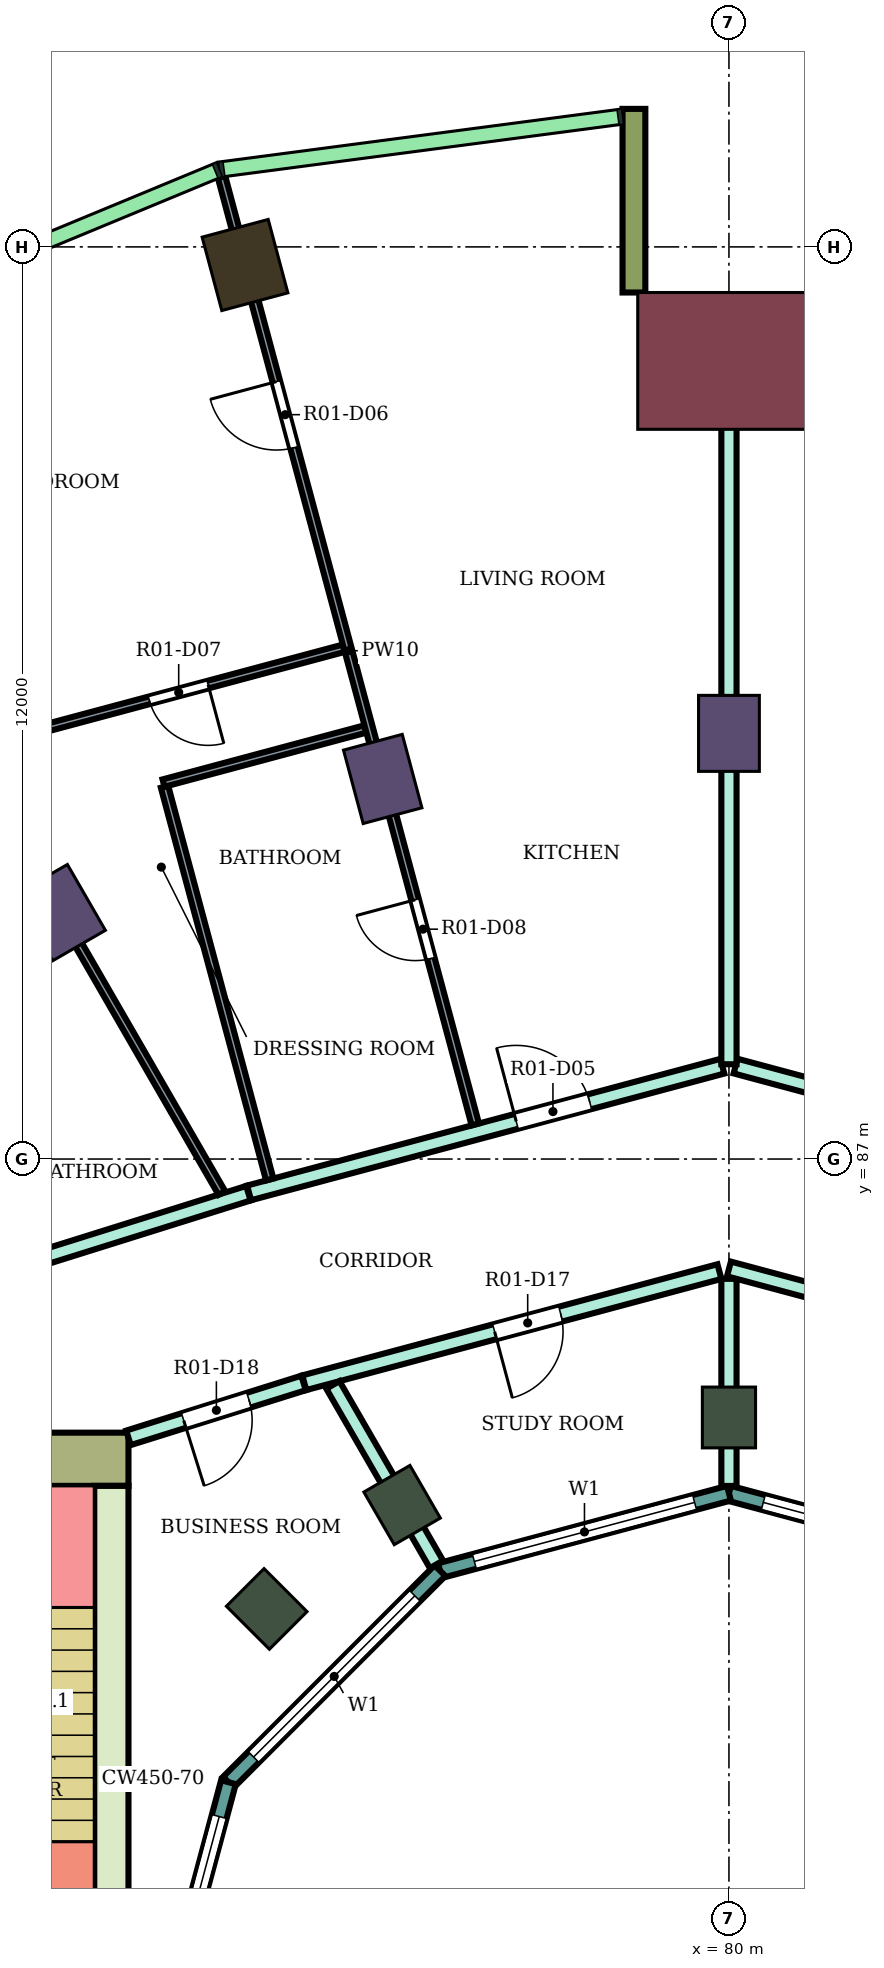
"""IFC4 building model, lengths in metres.
Left out: names, types, materials, properties, quantities, classifications, styles, units other than length and angle.
Written with IfcOpenShell. Run it as: python <this file> out.ifc"""

import sys

from ifc_helpers import new_model, si_unit, direction, frame, frame_2d, origin, origin_2d, place, context, subcontext, project, spatial, rectangle, extrude, element, fill, save


model = new_model("IFC4")
c1 = context("Model", 3, precision=1e-05, world=origin(), true_north=direction((0.0, 1.0)))
c2 = subcontext(c1, "Body", "Model", "MODEL_VIEW")
j1 = project(units=[si_unit("LENGTHUNIT", "METRE"), si_unit("PLANEANGLEUNIT", "RADIAN")], contexts=[c1])
p1 = place(None, origin())
s1 = spatial("IfcSite", under=j1, at=p1, CompositionType="ELEMENT")
p2 = place(p1, origin())
s2 = spatial("IfcBuilding", under=s1, at=p2, CompositionType="ELEMENT")
p3 = place(p2, frame((0.0, 0.0, 161.8)))
s3 = spatial("IfcBuildingStorey", under=s2, at=p3, CompositionType="ELEMENT", Elevation=161.8)
p4 = place(p3, frame((73.633, 98.762, 0.0), z_axis=(0.0, 0.0, 1.0), x_axis=(-0.258819045103, 0.965925826289, 0.0)))
e1 = element("IfcColumn", 1, at=p4, inside=s3, PredefinedType="COLUMN", context=c2, shape_type="SweptSolid", body=[
    extrude(rectangle(XDim=1.0, YDim=0.9, at=origin_2d()), origin(), (0.0, 0.0, 1.0), 4.1),
])
for number, where, z_axis, x_axis in (
    (2, (80.0, 92.6, 0.0), (0.0, 0.0, 1.0), (0.0, 1.0, 0.0)),
    (3, (75.445, 92.0, 0.0), (0.0, 0.0, 1.0), (-0.259, 0.966, 0.0)),
    (4, (71.2, 90.242, 0.0), (0.0, 0.0, 1.0), (-0.5, 0.866, 0.0)),
):
    element("IfcColumn", number, at=place(p3, frame(where, z_axis=z_axis, x_axis=x_axis)), inside=s3, PredefinedType="COLUMN", context=c2, shape_type="SweptSolid", body=[
        extrude(rectangle(XDim=1.0, YDim=0.8, at=origin_2d()), origin(), (0.0, 0.0, 1.0), 4.1),
    ])
for number, where, z_axis, x_axis in (
    (5, (80.0, 83.6, 0.0), (0.0, 0.0, 1.0), (0.0, 1.0, 0.0)),
    (6, (75.7, 82.448, 0.0), (0.0, 0.0, 1.0), (-0.5, 0.866, 0.0)),
    (7, (73.919, 81.081, 0.0), (0.0, 0.0, 1.0), (-0.707, 0.707, 0.0)),
):
    element("IfcColumn", number, at=place(p3, frame(where, z_axis=z_axis, x_axis=x_axis)), inside=s3, PredefinedType="COLUMN", context=c2, shape_type="SweptSolid", body=[
        extrude(rectangle(XDim=0.8, YDim=0.7, at=origin_2d()), origin(), (0.0, 0.0, 1.0), 4.1),
    ])
p5 = place(p3, frame((80.0, 97.5, 0.0), z_axis=(0.0, 0.0, 1.0), x_axis=(0.0, 1.0, 0.0)))
e8 = element("IfcColumn", 8, at=p5, inside=s3, PredefinedType="COLUMN", context=c2, shape_type="SweptSolid", body=[
    extrude(rectangle(XDim=1.8, YDim=2.4, at=origin_2d()), origin(), (0.0, 0.0, 1.0), 4.1),
])
p6 = place(p3, frame((72.1, 83.05, 0.0), z_axis=(0.0, 0.0, 1.0), x_axis=(-1.0, 0.0, 0.0)))
e9 = element("IfcWall", 9, at=p6, inside=s3, PredefinedType="SHEAR", context=c2, shape_type="SweptSolid", body=[
    extrude(rectangle(XDim=14.8, YDim=0.7, at=frame_2d((7.4, 0.0))), origin(), (0.0, 0.0, 1.0), 3.78),
])
p7 = place(p6, frame((4.2, 0.0, 0.0)))
e10 = element("IfcOpeningElement", 10, at=p7, cuts=e9, PredefinedType="OPENING", context=c2, shape_type="SweptSolid", body=[
    extrude(rectangle(XDim=2.4, YDim=2.4, at=frame_2d((1.2, 1.2))), frame((0.0, 0.36, 0.0), z_axis=(0.0, -1.0, 0.0), x_axis=(1.0, 0.0, 0.0)), (0.0, 0.0, 1.0), 0.72),
])
p8 = place(p3, frame((71.875, 82.7, 0.0), z_axis=(0.0, 0.0, 1.0), x_axis=(0.0, -1.0, 0.0)))
e11 = element("IfcWall", 11, at=p8, inside=s3, PredefinedType="SHEAR", context=c2, shape_type="SweptSolid", body=[
    extrude(rectangle(XDim=7.7, YDim=0.45, at=frame_2d((3.85, 0.0))), origin(), (0.0, 0.0, 1.0), 3.78),
])
p9 = place(p3, frame((78.75, 98.4, 0.0), z_axis=(0.0, 0.0, 1.0), x_axis=(0.0, 1.0, 0.0)))
e12 = element("IfcWall", 12, at=p9, inside=s3, PredefinedType="NOTDEFINED", context=c2, shape_type="SweptSolid", body=[
    extrude(rectangle(XDim=2.416, YDim=0.3, at=frame_2d((1.208, 0.0))), origin(), (0.0, 0.0, 1.0), 4.1),
])
p10 = place(p3, frame((83.802, 81.585, 0.0), z_axis=(0.0, 0.0, 1.0), x_axis=(-0.965933654434, 0.258789828301, 0.0)))
e13 = element("IfcWall", 13, at=p10, inside=s3, PredefinedType="NOTDEFINED", context=c2, shape_type="SweptSolid", body=[
    extrude(rectangle(XDim=3.936, YDim=0.2, at=frame_2d((1.968, 0.0))), origin(), (0.0, 0.0, 1.0), 4.1),
])
p11 = place(p10, frame((0.468, 0.0, 0.9)))
e14 = element("IfcOpeningElement", 14, at=p11, cuts=e13, PredefinedType="OPENING", context=c2, shape_type="SweptSolid", body=[
    extrude(rectangle(XDim=3.0, YDim=2.3, at=frame_2d((1.5, 1.15))), frame((0.0, 0.11, 0.0), z_axis=(0.0, -1.0, 0.0), x_axis=(1.0, 0.0, 0.0)), (0.0, 0.0, 1.0), 0.22),
])
p12 = place(p3, frame((80.0, 82.604, 0.0), z_axis=(0.0, 0.0, 1.0), x_axis=(-0.965933654434, -0.258789828301, 0.0)))
e15 = element("IfcWall", 15, at=p12, inside=s3, PredefinedType="NOTDEFINED", context=c2, shape_type="SweptSolid", body=[
    extrude(rectangle(XDim=3.936, YDim=0.2, at=frame_2d((1.968, 0.0))), origin(), (0.0, 0.0, 1.0), 4.1),
])
p13 = place(p12, frame((0.468, 0.0, 0.9)))
e16 = element("IfcOpeningElement", 16, at=p13, cuts=e15, PredefinedType="OPENING", context=c2, shape_type="SweptSolid", body=[
    extrude(rectangle(XDim=3.0, YDim=2.3, at=frame_2d((1.5, 1.15))), frame((0.0, 0.11, 0.0), z_axis=(0.0, -1.0, 0.0), x_axis=(1.0, 0.0, 0.0)), (0.0, 0.0, 1.0), 0.22),
])
p14 = place(p3, frame((76.198, 81.585, 0.0), z_axis=(0.0, 0.0, 1.0), x_axis=(-0.707106781187, -0.707106781187, 0.0)))
e17 = element("IfcWall", 17, at=p14, inside=s3, PredefinedType="NOTDEFINED", context=c2, shape_type="SweptSolid", body=[
    extrude(rectangle(XDim=3.936, YDim=0.2, at=frame_2d((1.968, 0.0))), origin(), (0.0, 0.0, 1.0), 4.1),
])
p15 = place(p14, frame((0.468, 0.0, 0.9)))
e18 = element("IfcOpeningElement", 18, at=p15, cuts=e17, PredefinedType="OPENING", context=c2, shape_type="SweptSolid", body=[
    extrude(rectangle(XDim=3.0, YDim=2.3, at=frame_2d((1.5, 1.15))), frame((0.0, 0.11, 0.0), z_axis=(0.0, -1.0, 0.0), x_axis=(1.0, 0.0, 0.0)), (0.0, 0.0, 1.0), 0.22),
])
p16 = place(p3, frame((73.415, 78.802, 0.0), z_axis=(0.0, 0.0, 1.0), x_axis=(-0.258789828301, -0.965933654434, 0.0)))
e19 = element("IfcWall", 19, at=p16, inside=s3, PredefinedType="NOTDEFINED", context=c2, shape_type="SweptSolid", body=[
    extrude(rectangle(XDim=3.936, YDim=0.2, at=frame_2d((1.968, 0.0))), origin(), (0.0, 0.0, 1.0), 4.1),
])
p17 = place(p16, frame((0.468, 0.0, 0.9)))
e20 = element("IfcOpeningElement", 20, at=p17, cuts=e19, PredefinedType="OPENING", context=c2, shape_type="SweptSolid", body=[
    extrude(rectangle(XDim=3.0, YDim=2.3, at=frame_2d((1.5, 1.15))), frame((0.0, 0.11, 0.0), z_axis=(0.0, -1.0, 0.0), x_axis=(1.0, 0.0, 0.0)), (0.0, 0.0, 1.0), 0.22),
])
p18 = place(p3, frame((68.2, 84.834, 0.0), z_axis=(0.0, 0.0, 1.0), x_axis=(0.954272398161, 0.298938438661, 0.0)))
e21 = element("IfcWall", 21, at=p18, inside=s3, PredefinedType="PARTITIONING", context=c2, shape_type="SweptSolid", body=[
    extrude(rectangle(XDim=5.74, YDim=0.2, at=frame_2d((2.87, 0.0))), origin(), (0.0, 0.0, 1.0), 3.65),
])
p19 = place(p3, frame((72.1, 83.332, 0.0), z_axis=(0.0, 0.0, 1.0), x_axis=(0.954233106619, 0.299063836383, 0.0)))
e22 = element("IfcWall", 22, at=p19, inside=s3, PredefinedType="PARTITIONING", context=c2, shape_type="SweptSolid", body=[
    extrude(rectangle(XDim=2.414, YDim=0.2, at=frame_2d((1.207, 0.0))), origin(), (0.0, 0.0, 1.0), 3.65),
])
p20 = place(p19, frame((0.762, 0.0, 0.0)))
e23 = element("IfcOpeningElement", 23, at=p20, cuts=e22, PredefinedType="OPENING", context=c2, shape_type="SweptSolid", body=[
    extrude(rectangle(XDim=0.9, YDim=2.1, at=frame_2d((0.45, 1.05))), frame((0.0, 0.11, 0.0), z_axis=(0.0, -1.0, 0.0), x_axis=(1.0, 0.0, 0.0)), (0.0, 0.0, 1.0), 0.22),
])
p21 = place(p3, frame((73.687, 86.554, 0.0), z_axis=(0.0, 0.0, 1.0), x_axis=(0.965999420828, 0.258544230182, 0.0)))
e24 = element("IfcWall", 24, at=p21, inside=s3, PredefinedType="PARTITIONING", context=c2, shape_type="SweptSolid", body=[
    extrude(rectangle(XDim=6.446, YDim=0.2, at=frame_2d((3.223, 0.0))), origin(), (0.0, 0.0, 1.0), 3.65),
])
p22 = place(p21, frame((3.638, 0.0, 0.0)))
e25 = element("IfcOpeningElement", 25, at=p22, cuts=e24, PredefinedType="OPENING", context=c2, shape_type="SweptSolid", body=[
    extrude(rectangle(XDim=1.0, YDim=2.1, at=frame_2d((0.5, 1.05))), frame((0.0, 0.11, 0.0), z_axis=(0.0, -1.0, 0.0), x_axis=(1.0, 0.0, 0.0)), (0.0, 0.0, 1.0), 0.22),
])
p23 = place(p3, frame((74.413, 84.057, 0.0), z_axis=(0.0, 0.0, 1.0), x_axis=(0.965972135939, 0.258646153246, 0.0)))
e26 = element("IfcWall", 26, at=p23, inside=s3, PredefinedType="PARTITIONING", context=c2, shape_type="SweptSolid", body=[
    extrude(rectangle(XDim=5.654, YDim=0.2, at=frame_2d((2.827, 0.0))), origin(), (0.0, 0.0, 1.0), 3.65),
])
p24 = place(p23, frame((2.593, 0.0, 0.0)))
e27 = element("IfcOpeningElement", 27, at=p24, cuts=e26, PredefinedType="OPENING", context=c2, shape_type="SweptSolid", body=[
    extrude(rectangle(XDim=0.9, YDim=2.1, at=frame_2d((0.45, 1.05))), frame((0.0, 0.11, 0.0), z_axis=(0.0, -1.0, 0.0), x_axis=(1.0, 0.0, 0.0)), (0.0, 0.0, 1.0), 0.22),
])
p25 = place(p3, frame((74.79, 84.028, 0.0), z_axis=(0.0, 0.0, 1.0), x_axis=(0.499905962189, -0.866079689733, 0.0)))
e28 = element("IfcWall", 28, at=p25, inside=s3, PredefinedType="PARTITIONING", context=c2, shape_type="SweptSolid", body=[
    extrude(rectangle(XDim=2.726, YDim=0.2, at=frame_2d((1.363, 0.0))), origin(), (0.0, 0.0, 1.0), 3.65),
])
p26 = place(p3, frame((80.0, 82.699, 0.0), z_axis=(0.0, 0.0, 1.0), x_axis=(0.0, 1.0, 0.0)))
e29 = element("IfcWall", 29, at=p26, inside=s3, PredefinedType="PARTITIONING", context=c2, shape_type="SweptSolid", body=[
    extrude(rectangle(XDim=2.725, YDim=0.2, at=frame_2d((1.363, 0.0))), origin(), (0.0, 0.0, 1.0), 3.65),
])
p27 = place(p3, frame((80.0, 85.554, 0.0), z_axis=(0.0, 0.0, 1.0), x_axis=(0.965928989968, -0.258807237802, 0.0)))
e30 = element("IfcWall", 30, at=p27, inside=s3, PredefinedType="PARTITIONING", context=c2, shape_type="SweptSolid", body=[
    extrude(rectangle(XDim=5.774, YDim=0.2, at=frame_2d((2.887, 0.0))), origin(), (0.0, 0.0, 1.0), 3.65),
])
p28 = place(p27, frame((2.292, 0.0, 0.0)))
e31 = element("IfcOpeningElement", 31, at=p28, cuts=e30, PredefinedType="OPENING", context=c2, shape_type="SweptSolid", body=[
    extrude(rectangle(XDim=0.9, YDim=2.1, at=frame_2d((0.45, 1.05))), frame((0.0, 0.11, 0.0), z_axis=(0.0, -1.0, 0.0), x_axis=(1.0, 0.0, 0.0)), (0.0, 0.0, 1.0), 0.22),
])
p29 = place(p3, frame((80.087, 88.223, 0.0), z_axis=(0.0, 0.0, 1.0), x_axis=(0.965852330757, -0.25909317855, 0.0)))
e32 = element("IfcWall", 32, at=p29, inside=s3, PredefinedType="PARTITIONING", context=c2, shape_type="SweptSolid", body=[
    extrude(rectangle(XDim=6.436, YDim=0.2, at=frame_2d((3.218, 0.0))), origin(), (0.0, 0.0, 1.0), 3.65),
])
p30 = place(p29, frame((2.678, 0.0, 0.0)))
e33 = element("IfcOpeningElement", 33, at=p30, cuts=e32, PredefinedType="OPENING", context=c2, shape_type="SweptSolid", body=[
    extrude(rectangle(XDim=1.0, YDim=2.1, at=frame_2d((0.5, 1.05))), frame((0.0, 0.11, 0.0), z_axis=(0.0, -1.0, 0.0), x_axis=(1.0, 0.0, 0.0)), (0.0, 0.0, 1.0), 0.22),
])
p31 = place(p3, frame((80.0, 88.247, 0.0), z_axis=(0.0, 0.0, 1.0), x_axis=(0.0, 1.0, 0.0)))
e34 = element("IfcWall", 34, at=p31, inside=s3, PredefinedType="PARTITIONING", context=c2, shape_type="SweptSolid", body=[
    extrude(rectangle(XDim=9.952, YDim=0.2, at=frame_2d((4.976, 0.0))), origin(), (0.0, 0.0, 1.0), 3.65),
])
p32 = place(p3, frame((67.101, 97.342, 0.0), z_axis=(0.0, 0.0, 1.0), x_axis=(0.499929451451, -0.866066131177, 0.0)))
e35 = element("IfcWall", 35, at=p32, inside=s3, PredefinedType="PARTITIONING", context=c2, shape_type="SweptSolid", body=[
    extrude(rectangle(XDim=12.456, YDim=0.1, at=frame_2d((6.228, 0.0))), origin(), (0.0, 0.0, 1.0), 3.65),
])
p33 = place(p32, frame((2.434, 0.0, 0.0)))
e36 = element("IfcOpeningElement", 36, at=p33, cuts=e35, PredefinedType="OPENING", context=c2, shape_type="SweptSolid", body=[
    extrude(rectangle(XDim=0.9, YDim=2.1, at=frame_2d((0.45, 1.05))), frame((0.0, 0.06, 0.0), z_axis=(0.0, -1.0, 0.0), x_axis=(1.0, 0.0, 0.0)), (0.0, 0.0, 1.0), 0.12),
])
p34 = place(p3, frame((70.019, 92.405, 0.0), z_axis=(0.0, 0.0, 1.0), x_axis=(0.965982744428, 0.258606530209, 0.0)))
e37 = element("IfcWall", 37, at=p34, inside=s3, PredefinedType="PARTITIONING", context=c2, shape_type="SweptSolid", body=[
    extrude(rectangle(XDim=5.087, YDim=0.1, at=frame_2d((2.543, 0.0))), origin(), (0.0, 0.0, 1.0), 3.65),
])
p35 = place(p34, frame((2.438, 0.0, 0.0)))
e38 = element("IfcOpeningElement", 38, at=p35, cuts=e37, PredefinedType="OPENING", context=c2, shape_type="SweptSolid", body=[
    extrude(rectangle(XDim=0.8, YDim=2.1, at=frame_2d((0.4, 1.05))), frame((0.0, 0.06, 0.0), z_axis=(0.0, -1.0, 0.0), x_axis=(1.0, 0.0, 0.0)), (0.0, 0.0, 1.0), 0.12),
])
p36 = place(p3, frame((72.574, 91.898, 0.0), z_axis=(0.0, 0.0, 1.0), x_axis=(0.258739127054, -0.965947236722, 0.0)))
e39 = element("IfcWall", 39, at=p36, inside=s3, PredefinedType="PARTITIONING", context=c2, shape_type="SweptSolid", body=[
    extrude(rectangle(XDim=5.349, YDim=0.1, at=frame_2d((2.675, 0.0))), origin(), (0.0, 0.0, 1.0), 3.65),
])
p37 = place(p3, frame((72.561, 91.946, 0.0), z_axis=(0.0, 0.0, 1.0), x_axis=(0.96591000446, 0.258878085754, 0.0)))
e40 = element("IfcWall", 40, at=p37, inside=s3, PredefinedType="PARTITIONING", context=c2, shape_type="SweptSolid", body=[
    extrude(rectangle(XDim=2.75, YDim=0.1, at=frame_2d((1.375, 0.0))), origin(), (0.0, 0.0, 1.0), 3.65),
])
p38 = place(p3, frame((73.324, 99.92, 0.0), z_axis=(0.0, 0.0, 1.0), x_axis=(0.258710550884, -0.965954890697, 0.0)))
e41 = element("IfcWall", 41, at=p38, inside=s3, PredefinedType="PARTITIONING", context=c2, shape_type="SweptSolid", body=[
    extrude(rectangle(XDim=12.904, YDim=0.1, at=frame_2d((6.452, 0.0))), origin(), (0.0, 0.0, 1.0), 3.65),
])
p39 = place(p38, frame((2.787, 0.0, 0.0)))
e42 = element("IfcOpeningElement", 42, at=p39, cuts=e41, PredefinedType="OPENING", context=c2, shape_type="SweptSolid", body=[
    extrude(rectangle(XDim=0.9, YDim=2.1, at=frame_2d((0.45, 1.05))), frame((0.0, 0.06, 0.0), z_axis=(0.0, -1.0, 0.0), x_axis=(1.0, 0.0, 0.0)), (0.0, 0.0, 1.0), 0.12),
])
p40 = place(p38, frame((9.844, 0.0, 0.0)))
e43 = element("IfcOpeningElement", 43, at=p40, cuts=e41, PredefinedType="OPENING", context=c2, shape_type="SweptSolid", body=[
    extrude(rectangle(XDim=0.8, YDim=2.1, at=frame_2d((0.4, 1.05))), frame((0.0, 0.06, 0.0), z_axis=(0.0, -1.0, 0.0), x_axis=(1.0, 0.0, 0.0)), (0.0, 0.0, 1.0), 0.12),
])
p41 = place(p11, origin())
e44 = element("IfcWindow", 44, at=p41, inside=s3, PartitioningType="SINGLE_PANEL", PredefinedType="WINDOW", context=c2, shape_type="SweptSolid", body=[
    extrude(rectangle(XDim=3.0, YDim=2.3, at=frame_2d((1.5, 1.15))), frame((0.0, 0.03, 0.0), z_axis=(0.0, -1.0, 0.0), x_axis=(1.0, 0.0, 0.0)), (0.0, 0.0, 1.0), 0.06),
])
fill(e14, e44)
p42 = place(p13, origin())
e45 = element("IfcWindow", 45, at=p42, inside=s3, PartitioningType="SINGLE_PANEL", PredefinedType="WINDOW", context=c2, shape_type="SweptSolid", body=[
    extrude(rectangle(XDim=3.0, YDim=2.3, at=frame_2d((1.5, 1.15))), frame((0.0, 0.03, 0.0), z_axis=(0.0, -1.0, 0.0), x_axis=(1.0, 0.0, 0.0)), (0.0, 0.0, 1.0), 0.06),
])
fill(e16, e45)
p43 = place(p15, origin())
e46 = element("IfcWindow", 46, at=p43, inside=s3, PartitioningType="SINGLE_PANEL", PredefinedType="WINDOW", context=c2, shape_type="SweptSolid", body=[
    extrude(rectangle(XDim=3.0, YDim=2.3, at=frame_2d((1.5, 1.15))), frame((0.0, 0.03, 0.0), z_axis=(0.0, -1.0, 0.0), x_axis=(1.0, 0.0, 0.0)), (0.0, 0.0, 1.0), 0.06),
])
fill(e18, e46)
p44 = place(p17, origin())
e47 = element("IfcWindow", 47, at=p44, inside=s3, PartitioningType="SINGLE_PANEL", PredefinedType="WINDOW", context=c2, shape_type="SweptSolid", body=[
    extrude(rectangle(XDim=3.0, YDim=2.3, at=frame_2d((1.5, 1.15))), frame((0.0, 0.03, 0.0), z_axis=(0.0, -1.0, 0.0), x_axis=(1.0, 0.0, 0.0)), (0.0, 0.0, 1.0), 0.06),
])
fill(e20, e47)
p45 = place(p22, origin())
e48 = element("IfcDoor", 48, at=p45, inside=s3, OperationType="SINGLE_SWING_LEFT", PredefinedType="DOOR", context=c2, shape_type="SweptSolid", body=[
    extrude(rectangle(XDim=1.0, YDim=2.1, at=frame_2d((0.5, 1.05))), frame((0.0, 0.025, 0.0), z_axis=(0.0, -1.0, 0.0), x_axis=(1.0, 0.0, 0.0)), (0.0, 0.0, 1.0), 0.05),
])
fill(e25, e48)
p46 = place(p39, frame((0.9, 0.0, 0.0), z_axis=(0.0, 0.0, 1.0), x_axis=(-1.0, 0.0, 0.0)))
e49 = element("IfcDoor", 49, at=p46, inside=s3, OperationType="SINGLE_SWING_RIGHT", PredefinedType="DOOR", context=c2, shape_type="SweptSolid", body=[
    extrude(rectangle(XDim=0.9, YDim=2.1, at=frame_2d((0.45, 1.05))), frame((0.0, 0.025, 0.0), z_axis=(0.0, -1.0, 0.0), x_axis=(1.0, 0.0, 0.0)), (0.0, 0.0, 1.0), 0.05),
])
fill(e42, e49)
p47 = place(p35, frame((0.8, 0.0, 0.0), z_axis=(0.0, 0.0, 1.0), x_axis=(-1.0, 0.0, 0.0)))
e50 = element("IfcDoor", 50, at=p47, inside=s3, OperationType="SINGLE_SWING_LEFT", PredefinedType="DOOR", context=c2, shape_type="SweptSolid", body=[
    extrude(rectangle(XDim=0.8, YDim=2.1, at=frame_2d((0.4, 1.05))), frame((0.0, 0.025, 0.0), z_axis=(0.0, -1.0, 0.0), x_axis=(1.0, 0.0, 0.0)), (0.0, 0.0, 1.0), 0.05),
])
fill(e38, e50)
p48 = place(p40, frame((0.8, 0.0, 0.0), z_axis=(0.0, 0.0, 1.0), x_axis=(-1.0, 0.0, 0.0)))
e51 = element("IfcDoor", 51, at=p48, inside=s3, OperationType="SINGLE_SWING_RIGHT", PredefinedType="DOOR", context=c2, shape_type="SweptSolid", body=[
    extrude(rectangle(XDim=0.8, YDim=2.1, at=frame_2d((0.4, 1.05))), frame((0.0, 0.025, 0.0), z_axis=(0.0, -1.0, 0.0), x_axis=(1.0, 0.0, 0.0)), (0.0, 0.0, 1.0), 0.05),
])
fill(e43, e51)
p49 = place(p24, frame((0.9, 0.0, 0.0), z_axis=(0.0, 0.0, 1.0), x_axis=(-1.0, 0.0, 0.0)))
e52 = element("IfcDoor", 52, at=p49, inside=s3, OperationType="SINGLE_SWING_RIGHT", PredefinedType="DOOR", context=c2, shape_type="SweptSolid", body=[
    extrude(rectangle(XDim=0.9, YDim=2.1, at=frame_2d((0.45, 1.05))), frame((0.0, 0.025, 0.0), z_axis=(0.0, -1.0, 0.0), x_axis=(1.0, 0.0, 0.0)), (0.0, 0.0, 1.0), 0.05),
])
fill(e27, e52)
p50 = place(p20, frame((0.9, 0.0, 0.0), z_axis=(0.0, 0.0, 1.0), x_axis=(-1.0, 0.0, 0.0)))
e53 = element("IfcDoor", 53, at=p50, inside=s3, OperationType="SINGLE_SWING_RIGHT", PredefinedType="DOOR", context=c2, shape_type="SweptSolid", body=[
    extrude(rectangle(XDim=0.9, YDim=2.1, at=frame_2d((0.45, 1.05))), frame((0.0, 0.025, 0.0), z_axis=(0.0, -1.0, 0.0), x_axis=(1.0, 0.0, 0.0)), (0.0, 0.0, 1.0), 0.05),
])
fill(e23, e53)
save(model, sys.argv[1])
